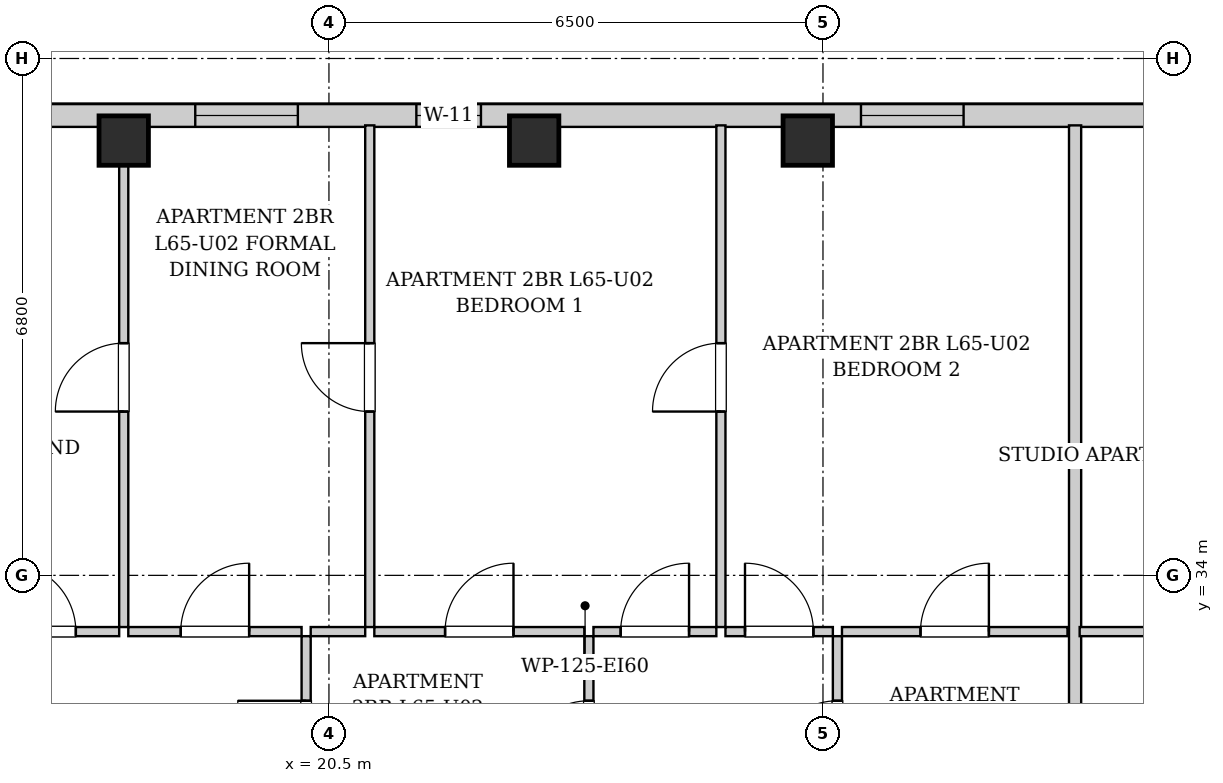
"""IFC4 building model, lengths in metres.
Left out: names, types, materials, properties, quantities, classifications, styles, units other than length and angle.
Written with IfcOpenShell. Run it as: python <this file> out.ifc"""

import sys

from ifc_helpers import new_model, si_unit, direction, frame, frame_2d, origin, origin_2d, place, context, subcontext, project, spatial, rectangle, extrude, element, fill, save


model = new_model("IFC4")
c1 = context("Model", 3, precision=1e-05, world=origin(), true_north=direction((0.0, 1.0)))
c2 = subcontext(c1, "Body", "Model", "MODEL_VIEW")
j1 = project(units=[si_unit("LENGTHUNIT", "METRE"), si_unit("PLANEANGLEUNIT", "RADIAN")], contexts=[c1])
p1 = place(None, origin())
s1 = spatial("IfcSite", under=j1, at=p1, CompositionType="ELEMENT")
p2 = place(p1, origin())
s2 = spatial("IfcBuilding", under=s1, at=p2, CompositionType="ELEMENT")
p3 = place(p2, frame((0.0, 0.0, 224.1)))
s3 = spatial("IfcBuildingStorey", under=s2, at=p3, CompositionType="ELEMENT", Elevation=224.1)
for number, where, z_axis, x_axis in (
    (1, (17.8, 39.72, 0.0), (0.0, 0.0, 1.0), (1.0, 0.0, 0.0)),
    (2, (23.2, 39.72, 0.0), (0.0, 0.0, 1.0), (1.0, 0.0, 0.0)),
    (3, (26.8, 39.72, 0.0), (0.0, 0.0, 1.0), (1.0, 0.0, 0.0)),
):
    element("IfcColumn", number, at=place(p3, frame(where, z_axis=z_axis, x_axis=x_axis)), inside=s3, PredefinedType="COLUMN", context=c2, shape_type="SweptSolid", body=[
        extrude(rectangle(XDim=0.65, YDim=0.65, at=origin_2d()), origin(), (0.0, 0.0, 1.0), 3.4),
    ])
p4 = place(p3, frame((13.1, 40.05, 0.0), z_axis=(0.0, 0.0, 1.0), x_axis=(1.0, 0.0, 0.0)))
e4 = element("IfcWall", 4, at=p4, inside=s3, PredefinedType="SOLIDWALL", context=c2, shape_type="SweptSolid", body=[
    extrude(rectangle(XDim=18.8, YDim=0.3, at=frame_2d((9.4, 0.0))), origin(), (0.0, 0.0, 1.0), 3.14),
])
p5 = place(p4, frame((1.806, 0.0, 0.55)))
e5 = element("IfcOpeningElement", 5, at=p5, cuts=e4, PredefinedType="OPENING", context=c2, shape_type="SweptSolid", body=[
    extrude(rectangle(XDim=1.35, YDim=1.2, at=frame_2d((0.675, 0.6))), frame((0.0, 0.16, 0.0), z_axis=(0.0, -1.0, 0.0), x_axis=(1.0, 0.0, 0.0)), (0.0, 0.0, 1.0), 0.32),
])
p6 = place(p4, frame((5.641, 0.0, 0.55)))
e6 = element("IfcOpeningElement", 6, at=p6, cuts=e4, PredefinedType="OPENING", context=c2, shape_type="SweptSolid", body=[
    extrude(rectangle(XDim=1.35, YDim=1.2, at=frame_2d((0.675, 0.6))), frame((0.0, 0.16, 0.0), z_axis=(0.0, -1.0, 0.0), x_axis=(1.0, 0.0, 0.0)), (0.0, 0.0, 1.0), 0.32),
])
p7 = place(p4, frame((8.55, 0.0, 0.55)))
e7 = element("IfcOpeningElement", 7, at=p7, cuts=e4, PredefinedType="OPENING", context=c2, shape_type="SweptSolid", body=[
    extrude(rectangle(XDim=0.85, YDim=1.2, at=frame_2d((0.425, 0.6))), frame((0.0, 0.16, 0.0), z_axis=(0.0, -1.0, 0.0), x_axis=(1.0, 0.0, 0.0)), (0.0, 0.0, 1.0), 0.32),
])
p8 = place(p4, frame((14.4, 0.0, 0.55)))
e8 = element("IfcOpeningElement", 8, at=p8, cuts=e4, PredefinedType="OPENING", context=c2, shape_type="SweptSolid", body=[
    extrude(rectangle(XDim=1.35, YDim=1.2, at=frame_2d((0.675, 0.6))), frame((0.0, 0.16, 0.0), z_axis=(0.0, -1.0, 0.0), x_axis=(1.0, 0.0, 0.0)), (0.0, 0.0, 1.0), 0.32),
])
p9 = place(p3, frame((20.2, 30.6, 0.0), z_axis=(0.0, 0.0, 1.0), x_axis=(0.0, 1.0, 0.0)))
e9 = element("IfcWall", 9, at=p9, inside=s3, PredefinedType="PARTITIONING", context=c2, shape_type="SweptSolid", body=[
    extrude(rectangle(XDim=2.6, YDim=0.12, at=frame_2d((1.3, 0.0))), origin(), (0.0, 0.0, 1.0), 3.14),
])
p10 = place(p9, frame((0.85, 0.0, 0.0)))
e10 = element("IfcOpeningElement", 10, at=p10, cuts=e9, PredefinedType="OPENING", context=c2, shape_type="SweptSolid", body=[
    extrude(rectangle(XDim=0.9, YDim=2.05, at=frame_2d((0.45, 1.025))), frame((0.0, 0.07, 0.0), z_axis=(0.0, -1.0, 0.0), x_axis=(1.0, 0.0, 0.0)), (0.0, 0.0, 1.0), 0.14),
])
p11 = place(p3, frame((15.7, 33.26, 0.0), z_axis=(0.0, 0.0, 1.0), x_axis=(1.0, 0.0, 0.0)))
e11 = element("IfcWall", 11, at=p11, inside=s3, PredefinedType="PARTITIONING", context=c2, shape_type="SweptSolid", body=[
    extrude(rectangle(XDim=2.04, YDim=0.12, at=frame_2d((1.02, 0.0))), origin(), (0.0, 0.0, 1.0), 3.14),
])
p12 = place(p11, frame((0.57, 0.0, 0.0)))
e12 = element("IfcOpeningElement", 12, at=p12, cuts=e11, PredefinedType="OPENING", context=c2, shape_type="SweptSolid", body=[
    extrude(rectangle(XDim=0.9, YDim=2.05, at=frame_2d((0.45, 1.025))), frame((0.0, 0.07, 0.0), z_axis=(0.0, -1.0, 0.0), x_axis=(1.0, 0.0, 0.0)), (0.0, 0.0, 1.0), 0.14),
])
p13 = place(p3, frame((17.86, 33.26, 0.0), z_axis=(0.0, 0.0, 1.0), x_axis=(1.0, 0.0, 0.0)))
e13 = element("IfcWall", 13, at=p13, inside=s3, PredefinedType="PARTITIONING", context=c2, shape_type="SweptSolid", body=[
    extrude(rectangle(XDim=2.28, YDim=0.12, at=frame_2d((1.14, 0.0))), origin(), (0.0, 0.0, 1.0), 3.14),
])
p14 = place(p13, frame((0.69, 0.0, 0.0)))
e14 = element("IfcOpeningElement", 14, at=p14, cuts=e13, PredefinedType="OPENING", context=c2, shape_type="SweptSolid", body=[
    extrude(rectangle(XDim=0.9, YDim=2.05, at=frame_2d((0.45, 1.025))), frame((0.0, 0.07, 0.0), z_axis=(0.0, -1.0, 0.0), x_axis=(1.0, 0.0, 0.0)), (0.0, 0.0, 1.0), 0.14),
])
p15 = place(p3, frame((23.92, 30.6, 0.0), z_axis=(0.0, 0.0, 1.0), x_axis=(0.0, 1.0, 0.0)))
e15 = element("IfcWall", 15, at=p15, inside=s3, PredefinedType="PARTITIONING", context=c2, shape_type="SweptSolid", body=[
    extrude(rectangle(XDim=2.6, YDim=0.12, at=frame_2d((1.3, 0.0))), origin(), (0.0, 0.0, 1.0), 3.14),
])
p16 = place(p15, frame((0.85, 0.0, 0.0)))
e16 = element("IfcOpeningElement", 16, at=p16, cuts=e15, PredefinedType="OPENING", context=c2, shape_type="SweptSolid", body=[
    extrude(rectangle(XDim=0.9, YDim=2.05, at=frame_2d((0.45, 1.025))), frame((0.0, 0.07, 0.0), z_axis=(0.0, -1.0, 0.0), x_axis=(1.0, 0.0, 0.0)), (0.0, 0.0, 1.0), 0.14),
])
p17 = place(p3, frame((20.26, 33.26, 0.0), z_axis=(0.0, 0.0, 1.0), x_axis=(1.0, 0.0, 0.0)))
e17 = element("IfcWall", 17, at=p17, inside=s3, PredefinedType="PARTITIONING", context=c2, shape_type="SweptSolid", body=[
    extrude(rectangle(XDim=0.717, YDim=0.12, at=frame_2d((0.358, 0.0))), origin(), (0.0, 0.0, 1.0), 3.14),
])
p18 = place(p3, frame((21.097, 33.26, 0.0), z_axis=(0.0, 0.0, 1.0), x_axis=(1.0, 0.0, 0.0)))
e18 = element("IfcWall", 18, at=p18, inside=s3, PredefinedType="PARTITIONING", context=c2, shape_type="SweptSolid", body=[
    extrude(rectangle(XDim=2.763, YDim=0.12, at=frame_2d((1.382, 0.0))), origin(), (0.0, 0.0, 1.0), 3.14),
])
p19 = place(p18, frame((0.931, 0.0, 0.0)))
e19 = element("IfcOpeningElement", 19, at=p19, cuts=e18, PredefinedType="OPENING", context=c2, shape_type="SweptSolid", body=[
    extrude(rectangle(XDim=0.9, YDim=2.05, at=frame_2d((0.45, 1.025))), frame((0.0, 0.07, 0.0), z_axis=(0.0, -1.0, 0.0), x_axis=(1.0, 0.0, 0.0)), (0.0, 0.0, 1.0), 0.14),
])
p20 = place(p3, frame((27.19, 30.6, 0.0), z_axis=(0.0, 0.0, 1.0), x_axis=(0.0, 1.0, 0.0)))
e20 = element("IfcWall", 20, at=p20, inside=s3, PredefinedType="PARTITIONING", context=c2, shape_type="SweptSolid", body=[
    extrude(rectangle(XDim=2.6, YDim=0.12, at=frame_2d((1.3, 0.0))), origin(), (0.0, 0.0, 1.0), 3.14),
])
p21 = place(p20, frame((0.85, 0.0, 0.0)))
e21 = element("IfcOpeningElement", 21, at=p21, cuts=e20, PredefinedType="OPENING", context=c2, shape_type="SweptSolid", body=[
    extrude(rectangle(XDim=0.9, YDim=2.05, at=frame_2d((0.45, 1.025))), frame((0.0, 0.07, 0.0), z_axis=(0.0, -1.0, 0.0), x_axis=(1.0, 0.0, 0.0)), (0.0, 0.0, 1.0), 0.14),
])
p22 = place(p3, frame((23.98, 33.26, 0.0), z_axis=(0.0, 0.0, 1.0), x_axis=(1.0, 0.0, 0.0)))
e22 = element("IfcWall", 22, at=p22, inside=s3, PredefinedType="PARTITIONING", context=c2, shape_type="SweptSolid", body=[
    extrude(rectangle(XDim=1.617, YDim=0.12, at=frame_2d((0.809, 0.0))), origin(), (0.0, 0.0, 1.0), 3.14),
])
p23 = place(p22, frame((0.358, 0.0, 0.0)))
e23 = element("IfcOpeningElement", 23, at=p23, cuts=e22, PredefinedType="OPENING", context=c2, shape_type="SweptSolid", body=[
    extrude(rectangle(XDim=0.9, YDim=2.05, at=frame_2d((0.45, 1.025))), frame((0.0, 0.07, 0.0), z_axis=(0.0, -1.0, 0.0), x_axis=(1.0, 0.0, 0.0)), (0.0, 0.0, 1.0), 0.14),
])
p24 = place(p3, frame((25.717, 33.26, 0.0), z_axis=(0.0, 0.0, 1.0), x_axis=(1.0, 0.0, 0.0)))
e24 = element("IfcWall", 24, at=p24, inside=s3, PredefinedType="PARTITIONING", context=c2, shape_type="SweptSolid", body=[
    extrude(rectangle(XDim=1.413, YDim=0.12, at=frame_2d((0.707, 0.0))), origin(), (0.0, 0.0, 1.0), 3.14),
])
p25 = place(p24, frame((0.257, 0.0, 0.0)))
e25 = element("IfcOpeningElement", 25, at=p25, cuts=e24, PredefinedType="OPENING", context=c2, shape_type="SweptSolid", body=[
    extrude(rectangle(XDim=0.9, YDim=2.05, at=frame_2d((0.45, 1.025))), frame((0.0, 0.07, 0.0), z_axis=(0.0, -1.0, 0.0), x_axis=(1.0, 0.0, 0.0)), (0.0, 0.0, 1.0), 0.14),
])
p26 = place(p3, frame((27.25, 33.26, 0.0), z_axis=(0.0, 0.0, 1.0), x_axis=(1.0, 0.0, 0.0)))
e26 = element("IfcWall", 26, at=p26, inside=s3, PredefinedType="PARTITIONING", context=c2, shape_type="SweptSolid", body=[
    extrude(rectangle(XDim=2.967, YDim=0.12, at=frame_2d((1.483, 0.0))), origin(), (0.0, 0.0, 1.0), 3.14),
])
p27 = place(p26, frame((1.033, 0.0, 0.0)))
e27 = element("IfcOpeningElement", 27, at=p27, cuts=e26, PredefinedType="OPENING", context=c2, shape_type="SweptSolid", body=[
    extrude(rectangle(XDim=0.9, YDim=2.05, at=frame_2d((0.45, 1.025))), frame((0.0, 0.07, 0.0), z_axis=(0.0, -1.0, 0.0), x_axis=(1.0, 0.0, 0.0)), (0.0, 0.0, 1.0), 0.14),
])
p28 = place(p3, frame((17.8, 33.32, 0.0), z_axis=(0.0, 0.0, 1.0), x_axis=(0.0, 1.0, 0.0)))
e28 = element("IfcWall", 28, at=p28, inside=s3, PredefinedType="PARTITIONING", context=c2, shape_type="SweptSolid", body=[
    extrude(rectangle(XDim=6.6, YDim=0.12, at=frame_2d((3.3, 0.0))), origin(), (0.0, 0.0, 1.0), 2.668),
])
p29 = place(p28, frame((2.835, 0.0, 0.0)))
e29 = element("IfcOpeningElement", 29, at=p29, cuts=e28, PredefinedType="OPENING", context=c2, shape_type="SweptSolid", body=[
    extrude(rectangle(XDim=0.9, YDim=2.05, at=frame_2d((0.45, 1.025))), frame((0.0, 0.07, 0.0), z_axis=(0.0, -1.0, 0.0), x_axis=(1.0, 0.0, 0.0)), (0.0, 0.0, 1.0), 0.14),
])
p30 = place(p3, frame((21.037, 33.32, 0.0), z_axis=(0.0, 0.0, 1.0), x_axis=(0.0, 1.0, 0.0)))
e30 = element("IfcWall", 30, at=p30, inside=s3, PredefinedType="PARTITIONING", context=c2, shape_type="SweptSolid", body=[
    extrude(rectangle(XDim=6.6, YDim=0.12, at=frame_2d((3.3, 0.0))), origin(), (0.0, 0.0, 1.0), 3.14),
])
p31 = place(p30, frame((2.835, 0.0, 0.0)))
e31 = element("IfcOpeningElement", 31, at=p31, cuts=e30, PredefinedType="OPENING", context=c2, shape_type="SweptSolid", body=[
    extrude(rectangle(XDim=0.9, YDim=2.05, at=frame_2d((0.45, 1.025))), frame((0.0, 0.07, 0.0), z_axis=(0.0, -1.0, 0.0), x_axis=(1.0, 0.0, 0.0)), (0.0, 0.0, 1.0), 0.14),
])
p32 = place(p3, frame((25.657, 33.32, 0.0), z_axis=(0.0, 0.0, 1.0), x_axis=(0.0, 1.0, 0.0)))
e32 = element("IfcWall", 32, at=p32, inside=s3, PredefinedType="PARTITIONING", context=c2, shape_type="SweptSolid", body=[
    extrude(rectangle(XDim=6.6, YDim=0.12, at=frame_2d((3.3, 0.0))), origin(), (0.0, 0.0, 1.0), 3.14),
])
p33 = place(p32, frame((2.835, 0.0, 0.0)))
e33 = element("IfcOpeningElement", 33, at=p33, cuts=e32, PredefinedType="OPENING", context=c2, shape_type="SweptSolid", body=[
    extrude(rectangle(XDim=0.9, YDim=2.05, at=frame_2d((0.45, 1.025))), frame((0.0, 0.07, 0.0), z_axis=(0.0, -1.0, 0.0), x_axis=(1.0, 0.0, 0.0)), (0.0, 0.0, 1.0), 0.14),
])
p34 = place(p3, frame((30.317, 30.6, 0.0), z_axis=(0.0, 0.0, 1.0), x_axis=(0.0, 1.0, 0.0)))
e34 = element("IfcWall", 34, at=p34, inside=s3, PredefinedType="PARTITIONING", context=c2, shape_type="SweptSolid", body=[
    extrude(rectangle(XDim=9.32, YDim=0.16, at=frame_2d((4.66, 0.0))), origin(), (0.0, 0.0, 1.0), 3.14),
])
p35 = place(p3, frame((30.377, 33.26, 0.0), z_axis=(0.0, 0.0, 1.0), x_axis=(1.0, 0.0, 0.0)))
e35 = element("IfcWall", 35, at=p35, inside=s3, PredefinedType="PARTITIONING", context=c2, shape_type="SweptSolid", body=[
    extrude(rectangle(XDim=2.203, YDim=0.12, at=frame_2d((1.102, 0.0))), origin(), (0.0, 0.0, 1.0), 3.14),
])
p36 = place(p10, origin())
e36 = element("IfcDoor", 36, at=p36, inside=s3, OperationType="SINGLE_SWING_RIGHT", PredefinedType="DOOR", context=c2, shape_type="SweptSolid", body=[
    extrude(rectangle(XDim=0.9, YDim=2.05, at=frame_2d((0.45, 1.025))), frame((0.0, 0.025, 0.0), z_axis=(0.0, -1.0, 0.0), x_axis=(1.0, 0.0, 0.0)), (0.0, 0.0, 1.0), 0.05),
])
fill(e10, e36)
p37 = place(p12, origin())
e37 = element("IfcDoor", 37, at=p37, inside=s3, OperationType="SINGLE_SWING_LEFT", PredefinedType="DOOR", context=c2, shape_type="SweptSolid", body=[
    extrude(rectangle(XDim=0.9, YDim=2.05, at=frame_2d((0.45, 1.025))), frame((0.0, 0.025, 0.0), z_axis=(0.0, -1.0, 0.0), x_axis=(1.0, 0.0, 0.0)), (0.0, 0.0, 1.0), 0.05),
])
fill(e12, e37)
p38 = place(p14, origin())
e38 = element("IfcDoor", 38, at=p38, inside=s3, OperationType="SINGLE_SWING_RIGHT", PredefinedType="DOOR", context=c2, shape_type="SweptSolid", body=[
    extrude(rectangle(XDim=0.9, YDim=2.05, at=frame_2d((0.45, 1.025))), frame((0.0, 0.025, 0.0), z_axis=(0.0, -1.0, 0.0), x_axis=(1.0, 0.0, 0.0)), (0.0, 0.0, 1.0), 0.05),
])
fill(e14, e38)
p39 = place(p16, origin())
e39 = element("IfcDoor", 39, at=p39, inside=s3, OperationType="SINGLE_SWING_LEFT", PredefinedType="DOOR", context=c2, shape_type="SweptSolid", body=[
    extrude(rectangle(XDim=0.9, YDim=2.05, at=frame_2d((0.45, 1.025))), frame((0.0, 0.025, 0.0), z_axis=(0.0, -1.0, 0.0), x_axis=(1.0, 0.0, 0.0)), (0.0, 0.0, 1.0), 0.05),
])
fill(e16, e39)
p40 = place(p19, origin())
e40 = element("IfcDoor", 40, at=p40, inside=s3, OperationType="SINGLE_SWING_RIGHT", PredefinedType="DOOR", context=c2, shape_type="SweptSolid", body=[
    extrude(rectangle(XDim=0.9, YDim=2.05, at=frame_2d((0.45, 1.025))), frame((0.0, 0.025, 0.0), z_axis=(0.0, -1.0, 0.0), x_axis=(1.0, 0.0, 0.0)), (0.0, 0.0, 1.0), 0.05),
])
fill(e19, e40)
p41 = place(p21, origin())
e41 = element("IfcDoor", 41, at=p41, inside=s3, OperationType="SINGLE_SWING_LEFT", PredefinedType="DOOR", context=c2, shape_type="SweptSolid", body=[
    extrude(rectangle(XDim=0.9, YDim=2.05, at=frame_2d((0.45, 1.025))), frame((0.0, 0.025, 0.0), z_axis=(0.0, -1.0, 0.0), x_axis=(1.0, 0.0, 0.0)), (0.0, 0.0, 1.0), 0.05),
])
fill(e21, e41)
p42 = place(p23, origin())
e42 = element("IfcDoor", 42, at=p42, inside=s3, OperationType="SINGLE_SWING_RIGHT", PredefinedType="DOOR", context=c2, shape_type="SweptSolid", body=[
    extrude(rectangle(XDim=0.9, YDim=2.05, at=frame_2d((0.45, 1.025))), frame((0.0, 0.025, 0.0), z_axis=(0.0, -1.0, 0.0), x_axis=(1.0, 0.0, 0.0)), (0.0, 0.0, 1.0), 0.05),
])
fill(e23, e42)
p43 = place(p25, origin())
e43 = element("IfcDoor", 43, at=p43, inside=s3, OperationType="SINGLE_SWING_LEFT", PredefinedType="DOOR", context=c2, shape_type="SweptSolid", body=[
    extrude(rectangle(XDim=0.9, YDim=2.05, at=frame_2d((0.45, 1.025))), frame((0.0, 0.025, 0.0), z_axis=(0.0, -1.0, 0.0), x_axis=(1.0, 0.0, 0.0)), (0.0, 0.0, 1.0), 0.05),
])
fill(e25, e43)
p44 = place(p27, origin())
e44 = element("IfcDoor", 44, at=p44, inside=s3, OperationType="SINGLE_SWING_RIGHT", PredefinedType="DOOR", context=c2, shape_type="SweptSolid", body=[
    extrude(rectangle(XDim=0.9, YDim=2.05, at=frame_2d((0.45, 1.025))), frame((0.0, 0.025, 0.0), z_axis=(0.0, -1.0, 0.0), x_axis=(1.0, 0.0, 0.0)), (0.0, 0.0, 1.0), 0.05),
])
fill(e27, e44)
p45 = place(p29, origin())
e45 = element("IfcDoor", 45, at=p45, inside=s3, OperationType="SINGLE_SWING_LEFT", PredefinedType="DOOR", context=c2, shape_type="SweptSolid", body=[
    extrude(rectangle(XDim=0.9, YDim=2.05, at=frame_2d((0.45, 1.025))), frame((0.0, 0.025, 0.0), z_axis=(0.0, -1.0, 0.0), x_axis=(1.0, 0.0, 0.0)), (0.0, 0.0, 1.0), 0.05),
])
fill(e29, e45)
p46 = place(p31, origin())
e46 = element("IfcDoor", 46, at=p46, inside=s3, OperationType="SINGLE_SWING_RIGHT", PredefinedType="DOOR", context=c2, shape_type="SweptSolid", body=[
    extrude(rectangle(XDim=0.9, YDim=2.05, at=frame_2d((0.45, 1.025))), frame((0.0, 0.025, 0.0), z_axis=(0.0, -1.0, 0.0), x_axis=(1.0, 0.0, 0.0)), (0.0, 0.0, 1.0), 0.05),
])
fill(e31, e46)
p47 = place(p33, origin())
e47 = element("IfcDoor", 47, at=p47, inside=s3, OperationType="SINGLE_SWING_LEFT", PredefinedType="DOOR", context=c2, shape_type="SweptSolid", body=[
    extrude(rectangle(XDim=0.9, YDim=2.05, at=frame_2d((0.45, 1.025))), frame((0.0, 0.025, 0.0), z_axis=(0.0, -1.0, 0.0), x_axis=(1.0, 0.0, 0.0)), (0.0, 0.0, 1.0), 0.05),
])
fill(e33, e47)
p48 = place(p6, origin())
e48 = element("IfcWindow", 48, at=p48, inside=s3, PartitioningType="SINGLE_PANEL", PredefinedType="WINDOW", context=c2, shape_type="SweptSolid", body=[
    extrude(rectangle(XDim=1.35, YDim=1.2, at=frame_2d((0.675, 0.6))), frame((0.0, 0.03, 0.0), z_axis=(0.0, -1.0, 0.0), x_axis=(1.0, 0.0, 0.0)), (0.0, 0.0, 1.0), 0.06),
])
fill(e6, e48)
p49 = place(p7, origin())
e49 = element("IfcWindow", 49, at=p49, inside=s3, PartitioningType="SINGLE_PANEL", PredefinedType="WINDOW", context=c2, shape_type="SweptSolid", body=[
    extrude(rectangle(XDim=0.85, YDim=1.2, at=frame_2d((0.425, 0.6))), frame((0.0, 0.03, 0.0), z_axis=(0.0, -1.0, 0.0), x_axis=(1.0, 0.0, 0.0)), (0.0, 0.0, 1.0), 0.06),
])
fill(e7, e49)
p50 = place(p8, origin())
e50 = element("IfcWindow", 50, at=p50, inside=s3, PartitioningType="SINGLE_PANEL", PredefinedType="WINDOW", context=c2, shape_type="SweptSolid", body=[
    extrude(rectangle(XDim=1.35, YDim=1.2, at=frame_2d((0.675, 0.6))), frame((0.0, 0.03, 0.0), z_axis=(0.0, -1.0, 0.0), x_axis=(1.0, 0.0, 0.0)), (0.0, 0.0, 1.0), 0.06),
])
fill(e8, e50)
save(model, sys.argv[1])
